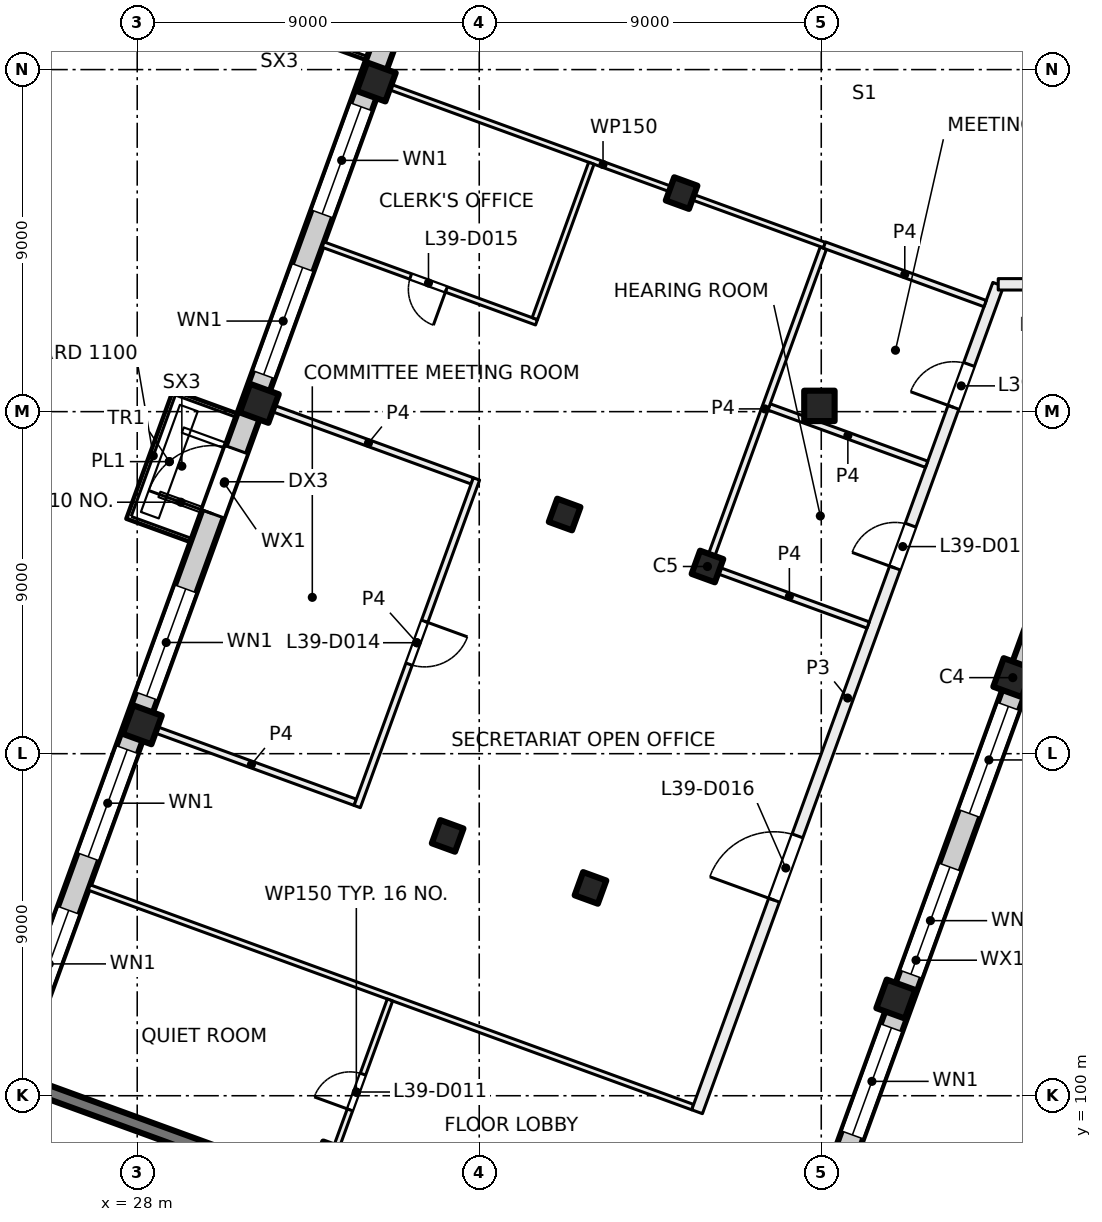
"""IFC4 building model, lengths in metres.
Left out: names, types, materials, properties, quantities, classifications, styles, units other than length and angle.
Written with IfcOpenShell. Run it as: python <this file> out.ifc"""

import sys

from ifc_helpers import new_model, si_unit, direction, frame, frame_2d, origin, origin_2d, place, context, subcontext, project, spatial, rectangle, extrude, element, fill, save


model = new_model("IFC4")
c1 = context("Model", 3, precision=1e-05, world=origin(), true_north=direction((0.0, 1.0)))
c2 = subcontext(c1, "Body", "Model", "MODEL_VIEW")
j1 = project(units=[si_unit("LENGTHUNIT", "METRE"), si_unit("PLANEANGLEUNIT", "RADIAN")], contexts=[c1])
p1 = place(None, origin())
s1 = spatial("IfcSite", under=j1, at=p1, CompositionType="ELEMENT")
p2 = place(p1, origin())
s2 = spatial("IfcBuilding", under=s1, at=p2, CompositionType="ELEMENT")
p3 = place(p2, frame((0.0, 0.0, 166.5)))
s3 = spatial("IfcBuildingStorey", under=s2, at=p3, CompositionType="ELEMENT", Elevation=166.5)
p4 = place(p3, frame((45.952, 118.152, 0.0), z_axis=(0.0, 0.0, 1.0), x_axis=(1.0, 0.0, 0.0)))
e1 = element("IfcColumn", 1, at=p4, inside=s3, PredefinedType="COLUMN", context=c2, shape_type="SweptSolid", body=[
    extrude(rectangle(XDim=0.8, YDim=0.8, at=origin_2d()), origin(), (0.0, 0.0, 1.0), 4.0),
])
for number, where, z_axis, x_axis in (
    (2, (43.006, 113.925, 0.0), (0.0, 0.0, 1.0), (-0.342, -0.94, 0.0)),
    (3, (39.927, 105.468, 0.0), (0.0, 0.0, 1.0), (-0.342, -0.94, 0.0)),
    (4, (42.325, 123.751, 0.0), (0.0, 0.0, 1.0), (-0.342, -0.94, 0.0)),
    (5, (39.247, 115.293, 0.0), (0.0, 0.0, 1.0), (-0.342, -0.94, 0.0)),
    (6, (36.169, 106.836, 0.0), (0.0, 0.0, 1.0), (-0.342, -0.94, 0.0)),
    (7, (33.091, 98.379, 0.0), (0.0, 0.0, 1.0), (-0.342, -0.94, 0.0)),
):
    element("IfcColumn", number, at=place(p3, frame(where, z_axis=z_axis, x_axis=x_axis)), inside=s3, PredefinedType="COLUMN", context=c2, shape_type="SweptSolid", body=[
        extrude(rectangle(XDim=0.65, YDim=0.65, at=origin_2d()), origin(), (0.0, 0.0, 1.0), 4.0),
    ])
for number, where, z_axis, x_axis in (
    (8, (51.04, 111.001, 0.0), (0.0, 0.0, 1.0), (-0.342, -0.94, 0.0)),
    (9, (47.962, 102.544, 0.0), (0.0, 0.0, 1.0), (-0.342, -0.94, 0.0)),
    (10, (34.291, 126.675, 0.0), (0.0, 0.0, 1.0), (-0.342, -0.94, 0.0)),
    (11, (31.212, 118.218, 0.0), (0.0, 0.0, 1.0), (-0.342, -0.94, 0.0)),
    (12, (28.134, 109.76, 0.0), (0.0, 0.0, 1.0), (-0.342, -0.94, 0.0)),
):
    element("IfcColumn", number, at=place(p3, frame(where, z_axis=z_axis, x_axis=x_axis)), inside=s3, PredefinedType="COLUMN", context=c2, shape_type="SweptSolid", body=[
        extrude(rectangle(XDim=0.8, YDim=0.8, at=origin_2d()), origin(), (0.0, 0.0, 1.0), 4.0),
    ])
p5 = place(p3, frame((32.962, 97.441, 0.0), z_axis=(0.0, 0.0, 1.0), x_axis=(-0.939689545667, 0.342028592028, 0.0)))
e13 = element("IfcWall", 13, at=p5, inside=s3, PredefinedType="SHEAR", context=c2, shape_type="SweptSolid", body=[
    extrude(rectangle(XDim=8.65, YDim=0.35, at=frame_2d((4.325, 0.0))), origin(), (0.0, 0.0, 1.0), 4.0),
])
p6 = place(p3, frame((52.212, 113.783, 0.0), z_axis=(0.0, 0.0, 1.0), x_axis=(-0.34202521188, -0.939690775968, 0.0)))
e14 = element("IfcWall", 14, at=p6, inside=s3, PredefinedType="SOLIDWALL", context=c2, shape_type="SweptSolid", body=[
    extrude(rectangle(XDim=21.745, YDim=0.6, at=frame_2d((10.873, 0.0))), origin(), (0.0, 0.0, 1.0), 3.625),
])
p7 = place(p6, frame((3.765, 0.0, 0.9)))
e15 = element("IfcOpeningElement", 15, at=p7, cuts=e14, PredefinedType="OPENING", context=c2, shape_type="SweptSolid", body=[
    extrude(rectangle(XDim=3.0, YDim=2.4, at=frame_2d((1.5, 1.2))), frame((0.0, 0.31, 0.0), z_axis=(0.0, -1.0, 0.0), x_axis=(1.0, 0.0, 0.0)), (0.0, 0.0, 1.0), 0.62),
])
p8 = place(p6, frame((8.265, 0.0, 0.9)))
e16 = element("IfcOpeningElement", 16, at=p8, cuts=e14, PredefinedType="OPENING", context=c2, shape_type="SweptSolid", body=[
    extrude(rectangle(XDim=3.0, YDim=2.4, at=frame_2d((1.5, 1.2))), frame((0.0, 0.31, 0.0), z_axis=(0.0, -1.0, 0.0), x_axis=(1.0, 0.0, 0.0)), (0.0, 0.0, 1.0), 0.62),
])
p9 = place(p6, frame((12.765, 0.0, 0.9)))
e17 = element("IfcOpeningElement", 17, at=p9, cuts=e14, PredefinedType="OPENING", context=c2, shape_type="SweptSolid", body=[
    extrude(rectangle(XDim=3.0, YDim=2.4, at=frame_2d((1.5, 1.2))), frame((0.0, 0.31, 0.0), z_axis=(0.0, -1.0, 0.0), x_axis=(1.0, 0.0, 0.0)), (0.0, 0.0, 1.0), 0.62),
])
p10 = place(p6, frame((17.265, 0.0, 0.9)))
e18 = element("IfcOpeningElement", 18, at=p10, cuts=e14, PredefinedType="OPENING", context=c2, shape_type="SweptSolid", body=[
    extrude(rectangle(XDim=3.0, YDim=2.4, at=frame_2d((1.5, 1.2))), frame((0.0, 0.31, 0.0), z_axis=(0.0, -1.0, 0.0), x_axis=(1.0, 0.0, 0.0)), (0.0, 0.0, 1.0), 0.62),
])
p11 = place(p3, frame((24.666, 100.669, 0.0), z_axis=(0.0, 0.0, 1.0), x_axis=(0.34201964167, 0.939692803373, 0.0)))
e19 = element("IfcWall", 19, at=p11, inside=s3, PredefinedType="SOLIDWALL", context=c2, shape_type="SweptSolid", body=[
    extrude(rectangle(XDim=32.884, YDim=0.6, at=frame_2d((16.442, 0.0))), origin(), (0.0, 0.0, 1.0), 3.625),
])
p12 = place(p11, frame((1.48, 0.0, 0.9)))
e20 = element("IfcOpeningElement", 20, at=p12, cuts=e19, PredefinedType="OPENING", context=c2, shape_type="SweptSolid", body=[
    extrude(rectangle(XDim=3.0, YDim=2.4, at=frame_2d((1.5, 1.2))), frame((0.0, 0.31, 0.0), z_axis=(0.0, -1.0, 0.0), x_axis=(1.0, 0.0, 0.0)), (0.0, 0.0, 1.0), 0.62),
])
p13 = place(p11, frame((5.98, 0.0, 0.9)))
e21 = element("IfcOpeningElement", 21, at=p13, cuts=e19, PredefinedType="OPENING", context=c2, shape_type="SweptSolid", body=[
    extrude(rectangle(XDim=3.0, YDim=2.4, at=frame_2d((1.5, 1.2))), frame((0.0, 0.31, 0.0), z_axis=(0.0, -1.0, 0.0), x_axis=(1.0, 0.0, 0.0)), (0.0, 0.0, 1.0), 0.62),
])
p14 = place(p11, frame((10.48, 0.0, 0.9)))
e22 = element("IfcOpeningElement", 22, at=p14, cuts=e19, PredefinedType="OPENING", context=c2, shape_type="SweptSolid", body=[
    extrude(rectangle(XDim=3.0, YDim=2.4, at=frame_2d((1.5, 1.2))), frame((0.0, 0.31, 0.0), z_axis=(0.0, -1.0, 0.0), x_axis=(1.0, 0.0, 0.0)), (0.0, 0.0, 1.0), 0.62),
])
p15 = place(p11, frame((15.58, 0.0, 0.0)))
e23 = element("IfcOpeningElement", 23, at=p15, cuts=e19, PredefinedType="OPENING", context=c2, shape_type="SweptSolid", body=[
    extrude(rectangle(XDim=1.8, YDim=2.4, at=frame_2d((0.9, 1.2))), frame((0.0, 0.31, 0.0), z_axis=(0.0, -1.0, 0.0), x_axis=(1.0, 0.0, 0.0)), (0.0, 0.0, 1.0), 0.62),
])
p16 = place(p11, frame((19.48, 0.0, 0.9)))
e24 = element("IfcOpeningElement", 24, at=p16, cuts=e19, PredefinedType="OPENING", context=c2, shape_type="SweptSolid", body=[
    extrude(rectangle(XDim=3.0, YDim=2.4, at=frame_2d((1.5, 1.2))), frame((0.0, 0.31, 0.0), z_axis=(0.0, -1.0, 0.0), x_axis=(1.0, 0.0, 0.0)), (0.0, 0.0, 1.0), 0.62),
])
p17 = place(p11, frame((23.98, 0.0, 0.9)))
e25 = element("IfcOpeningElement", 25, at=p17, cuts=e19, PredefinedType="OPENING", context=c2, shape_type="SweptSolid", body=[
    extrude(rectangle(XDim=3.0, YDim=2.4, at=frame_2d((1.5, 1.2))), frame((0.0, 0.31, 0.0), z_axis=(0.0, -1.0, 0.0), x_axis=(1.0, 0.0, 0.0)), (0.0, 0.0, 1.0), 0.62),
])
p18 = place(p11, frame((29.08, 0.0, 0.0)))
e26 = element("IfcOpeningElement", 26, at=p18, cuts=e19, PredefinedType="OPENING", context=c2, shape_type="SweptSolid", body=[
    extrude(rectangle(XDim=1.8, YDim=2.4, at=frame_2d((0.9, 1.2))), frame((0.0, 0.31, 0.0), z_axis=(0.0, -1.0, 0.0), x_axis=(1.0, 0.0, 0.0)), (0.0, 0.0, 1.0), 0.62),
])
p19 = place(p3, frame((26.736, 105.48, 0.0), z_axis=(0.0, 0.0, 1.0), x_axis=(0.939695108427, -0.342013308511, 0.0)))
e27 = element("IfcWall", 27, at=p19, inside=s3, PredefinedType="PARTITIONING", context=c2, shape_type="SweptSolid", body=[
    extrude(rectangle(XDim=16.9, YDim=0.15, at=frame_2d((8.45, 0.0))), origin(), (0.0, 0.0, 1.0), 3.625),
])
p20 = place(p3, frame((31.353, 118.166, 0.0), z_axis=(0.0, 0.0, 1.0), x_axis=(0.939708789041, -0.341975718143, 0.0)))
e28 = element("IfcWall", 28, at=p20, inside=s3, PredefinedType="PARTITIONING", context=c2, shape_type="SweptSolid", body=[
    extrude(rectangle(XDim=5.813, YDim=0.175, at=frame_2d((2.907, 0.0))), origin(), (0.0, 0.0, 1.0), 3.625),
])
p21 = place(p3, frame((33.737, 107.721, 0.0), z_axis=(0.0, 0.0, 1.0), x_axis=(-0.939694052357, 0.34201621009, 0.0)))
e29 = element("IfcWall", 29, at=p21, inside=s3, PredefinedType="PARTITIONING", context=c2, shape_type="SweptSolid", body=[
    extrude(rectangle(XDim=5.813, YDim=0.175, at=frame_2d((2.906, 0.0))), origin(), (0.0, 0.0, 1.0), 3.625),
])
p22 = place(p3, frame((34.431, 126.624, 0.0), z_axis=(0.0, 0.0, 1.0), x_axis=(0.939703144457, -0.341991228392, 0.0)))
e30 = element("IfcWall", 30, at=p22, inside=s3, PredefinedType="PARTITIONING", context=c2, shape_type="SweptSolid", body=[
    extrude(rectangle(XDim=12.401, YDim=0.15, at=frame_2d((6.2, 0.0))), origin(), (0.0, 0.0, 1.0), 3.625),
])
p23 = place(p3, frame((32.881, 97.657, 0.0), z_axis=(0.0, 0.0, 1.0), x_axis=(0.341981688871, 0.939706616172, 0.0)))
e31 = element("IfcWall", 31, at=p23, inside=s3, PredefinedType="PARTITIONING", context=c2, shape_type="SweptSolid", body=[
    extrude(rectangle(XDim=5.175, YDim=0.15, at=frame_2d((2.587, 0.0))), origin(), (0.0, 0.0, 1.0), 3.625),
])
p24 = place(p23, frame((2.098, 0.0, 0.0)))
e32 = element("IfcOpeningElement", 32, at=p24, cuts=e31, PredefinedType="OPENING", context=c2, shape_type="SweptSolid", body=[
    extrude(rectangle(XDim=1.0, YDim=2.1, at=frame_2d((0.5, 1.05))), frame((0.0, 0.085, 0.0), z_axis=(0.0, -1.0, 0.0), x_axis=(1.0, 0.0, 0.0)), (0.0, 0.0, 1.0), 0.17),
])
p25 = place(p3, frame((36.928, 116.23, 0.0), z_axis=(0.0, 0.0, 1.0), x_axis=(-0.342125481497, -0.93965427414, 0.0)))
e33 = element("IfcWall", 33, at=p25, inside=s3, PredefinedType="PARTITIONING", context=c2, shape_type="SweptSolid", body=[
    extrude(rectangle(XDim=9.175, YDim=0.175, at=frame_2d((4.587, 0.0))), origin(), (0.0, 0.0, 1.0), 3.625),
])
p26 = place(p25, frame((3.987, 0.0, 0.0)))
e34 = element("IfcOpeningElement", 34, at=p26, cuts=e33, PredefinedType="OPENING", context=c2, shape_type="SweptSolid", body=[
    extrude(rectangle(XDim=1.2, YDim=2.1, at=frame_2d((0.6, 1.05))), frame((0.0, 0.097, 0.0), z_axis=(0.0, -1.0, 0.0), x_axis=(1.0, 0.0, 0.0)), (0.0, 0.0, 1.0), 0.195),
])
p27 = place(p3, frame((38.507, 120.351, 0.0), z_axis=(0.0, 0.0, 1.0), x_axis=(-0.939678850769, 0.342057973766, 0.0)))
e35 = element("IfcWall", 35, at=p27, inside=s3, PredefinedType="PARTITIONING", context=c2, shape_type="SweptSolid", body=[
    extrude(rectangle(XDim=5.975, YDim=0.15, at=frame_2d((2.988, 0.0))), origin(), (0.0, 0.0, 1.0), 3.625),
])
p28 = place(p27, frame((2.525, 0.0, 0.0)))
e36 = element("IfcOpeningElement", 36, at=p28, cuts=e35, PredefinedType="OPENING", context=c2, shape_type="SweptSolid", body=[
    extrude(rectangle(XDim=1.0, YDim=2.1, at=frame_2d((0.5, 1.05))), frame((0.0, 0.085, 0.0), z_axis=(0.0, -1.0, 0.0), x_axis=(1.0, 0.0, 0.0)), (0.0, 0.0, 1.0), 0.17),
])
p29 = place(p3, frame((39.95, 124.536, 0.0), z_axis=(0.0, 0.0, 1.0), x_axis=(-0.341783611499, -0.939778677621, 0.0)))
e37 = element("IfcWall", 37, at=p29, inside=s3, PredefinedType="PARTITIONING", context=c2, shape_type="SweptSolid", body=[
    extrude(rectangle(XDim=4.351, YDim=0.15, at=frame_2d((2.175, 0.0))), origin(), (0.0, 0.0, 1.0), 3.625),
])
p30 = place(p3, frame((42.732, 99.579, 0.0), z_axis=(0.0, 0.0, 1.0), x_axis=(0.342036653044, 0.939686611576, 0.0)))
e38 = element("IfcWall", 38, at=p30, inside=s3, PredefinedType="PARTITIONING", context=c2, shape_type="SweptSolid", body=[
    extrude(rectangle(XDim=23.167, YDim=0.3, at=frame_2d((11.583, 0.0))), origin(), (0.0, 0.0, 1.0), 3.625),
])
p31 = place(p30, frame((15.225, 0.0, 0.0)))
e39 = element("IfcOpeningElement", 39, at=p31, cuts=e38, PredefinedType="OPENING", context=c2, shape_type="SweptSolid", body=[
    extrude(rectangle(XDim=1.2, YDim=2.1, at=frame_2d((0.6, 1.05))), frame((0.0, 0.16, 0.0), z_axis=(0.0, -1.0, 0.0), x_axis=(1.0, 0.0, 0.0)), (0.0, 0.0, 1.0), 0.32),
])
p32 = place(p30, frame((19.725, 0.0, 0.0)))
e40 = element("IfcOpeningElement", 40, at=p32, cuts=e38, PredefinedType="OPENING", context=c2, shape_type="SweptSolid", body=[
    extrude(rectangle(XDim=1.2, YDim=2.1, at=frame_2d((0.6, 1.05))), frame((0.0, 0.16, 0.0), z_axis=(0.0, -1.0, 0.0), x_axis=(1.0, 0.0, 0.0)), (0.0, 0.0, 1.0), 0.32),
])
p33 = place(p30, frame((5.925, 0.0, 0.0)))
e41 = element("IfcOpeningElement", 41, at=p33, cuts=e38, PredefinedType="OPENING", context=c2, shape_type="SweptSolid", body=[
    extrude(rectangle(XDim=1.8, YDim=2.1, at=frame_2d((0.9, 1.05))), frame((0.0, 0.16, 0.0), z_axis=(0.0, -1.0, 0.0), x_axis=(1.0, 0.0, 0.0)), (0.0, 0.0, 1.0), 0.32),
])
for number, where, z_axis, x_axis in (
    (42, (43.088, 113.895, 0.0), (0.0, 0.0, 1.0), (0.94, -0.342, 0.0)),
    (43, (44.627, 118.124, 0.0), (0.0, 0.0, 1.0), (0.94, -0.342, 0.0)),
):
    element("IfcWall", number, at=place(p3, frame(where, z_axis=z_axis, x_axis=x_axis)), inside=s3, PredefinedType="PARTITIONING", context=c2, shape_type="SweptSolid", body=[
        extrude(rectangle(XDim=4.412, YDim=0.175, at=frame_2d((2.206, 0.0))), origin(), (0.0, 0.0, 1.0), 3.625),
    ])
p34 = place(p3, frame((46.054, 122.301, 0.0), z_axis=(0.0, 0.0, 1.0), x_axis=(-0.341963022424, -0.939713409128, 0.0)))
e44 = element("IfcWall", 44, at=p34, inside=s3, PredefinedType="PARTITIONING", context=c2, shape_type="SweptSolid", body=[
    extrude(rectangle(XDim=9.001, YDim=0.175, at=frame_2d((4.5, 0.0))), origin(), (0.0, 0.0, 1.0), 3.625),
])
p35 = place(p3, frame((50.312, 120.843, 0.0), z_axis=(0.0, 0.0, 1.0), x_axis=(-0.939609529273, 0.342248349154, 0.0)))
e45 = element("IfcWall", 45, at=p35, inside=s3, PredefinedType="PARTITIONING", context=c2, shape_type="SweptSolid", body=[
    extrude(rectangle(XDim=4.5, YDim=0.175, at=frame_2d((2.25, 0.0))), origin(), (0.0, 0.0, 1.0), 3.625),
])
p36 = place(p3, frame((50.657, 121.35, 0.0), z_axis=(0.0, 0.0, 1.0), x_axis=(1.0, 0.0, 0.0)))
e46 = element("IfcWall", 46, at=p36, inside=s3, PredefinedType="PARTITIONING", context=c2, shape_type="SweptSolid", body=[
    extrude(rectangle(XDim=35.096, YDim=0.3, at=frame_2d((17.548, 0.0))), origin(), (0.0, 0.0, 1.0), 3.625),
])
p37 = place(p36, frame((30.093, 0.0, 0.0)))
e47 = element("IfcOpeningElement", 47, at=p37, cuts=e46, PredefinedType="OPENING", context=c2, shape_type="SweptSolid", body=[
    extrude(rectangle(XDim=1.0, YDim=2.1, at=frame_2d((0.5, 1.05))), frame((0.0, 0.16, 0.0), z_axis=(0.0, -1.0, 0.0), x_axis=(1.0, 0.0, 0.0)), (0.0, 0.0, 1.0), 0.32),
])
p38 = place(p36, frame((13.943, 0.0, 0.0)))
e48 = element("IfcOpeningElement", 48, at=p38, cuts=e46, PredefinedType="OPENING", context=c2, shape_type="SweptSolid", body=[
    extrude(rectangle(XDim=1.8, YDim=2.1, at=frame_2d((0.9, 1.05))), frame((0.0, 0.16, 0.0), z_axis=(0.0, -1.0, 0.0), x_axis=(1.0, 0.0, 0.0)), (0.0, 0.0, 1.0), 0.32),
])
p39 = place(p36, frame((0.896, 0.0, 0.0)))
e49 = element("IfcOpeningElement", 49, at=p39, cuts=e46, PredefinedType="OPENING", context=c2, shape_type="SweptSolid", body=[
    extrude(rectangle(XDim=1.8, YDim=2.1, at=frame_2d((0.9, 1.05))), frame((0.0, 0.16, 0.0), z_axis=(0.0, -1.0, 0.0), x_axis=(1.0, 0.0, 0.0)), (0.0, 0.0, 1.0), 0.32),
])
p40 = place(p7, origin())
e50 = element("IfcWindow", 50, at=p40, inside=s3, PartitioningType="SINGLE_PANEL", PredefinedType="WINDOW", context=c2, shape_type="SweptSolid", body=[
    extrude(rectangle(XDim=3.0, YDim=2.4, at=frame_2d((1.5, 1.2))), frame((0.0, 0.03, 0.0), z_axis=(0.0, -1.0, 0.0), x_axis=(1.0, 0.0, 0.0)), (0.0, 0.0, 1.0), 0.06),
])
fill(e15, e50)
p41 = place(p8, origin())
e51 = element("IfcWindow", 51, at=p41, inside=s3, PartitioningType="SINGLE_PANEL", PredefinedType="WINDOW", context=c2, shape_type="SweptSolid", body=[
    extrude(rectangle(XDim=3.0, YDim=2.4, at=frame_2d((1.5, 1.2))), frame((0.0, 0.03, 0.0), z_axis=(0.0, -1.0, 0.0), x_axis=(1.0, 0.0, 0.0)), (0.0, 0.0, 1.0), 0.06),
])
fill(e16, e51)
p42 = place(p9, origin())
e52 = element("IfcWindow", 52, at=p42, inside=s3, PartitioningType="SINGLE_PANEL", PredefinedType="WINDOW", context=c2, shape_type="SweptSolid", body=[
    extrude(rectangle(XDim=3.0, YDim=2.4, at=frame_2d((1.5, 1.2))), frame((0.0, 0.03, 0.0), z_axis=(0.0, -1.0, 0.0), x_axis=(1.0, 0.0, 0.0)), (0.0, 0.0, 1.0), 0.06),
])
fill(e17, e52)
p43 = place(p12, origin())
e53 = element("IfcWindow", 53, at=p43, inside=s3, PartitioningType="SINGLE_PANEL", PredefinedType="WINDOW", context=c2, shape_type="SweptSolid", body=[
    extrude(rectangle(XDim=3.0, YDim=2.4, at=frame_2d((1.5, 1.2))), frame((0.0, 0.03, 0.0), z_axis=(0.0, -1.0, 0.0), x_axis=(1.0, 0.0, 0.0)), (0.0, 0.0, 1.0), 0.06),
])
fill(e20, e53)
p44 = place(p13, origin())
e54 = element("IfcWindow", 54, at=p44, inside=s3, PartitioningType="SINGLE_PANEL", PredefinedType="WINDOW", context=c2, shape_type="SweptSolid", body=[
    extrude(rectangle(XDim=3.0, YDim=2.4, at=frame_2d((1.5, 1.2))), frame((0.0, 0.03, 0.0), z_axis=(0.0, -1.0, 0.0), x_axis=(1.0, 0.0, 0.0)), (0.0, 0.0, 1.0), 0.06),
])
fill(e21, e54)
p45 = place(p14, origin())
e55 = element("IfcWindow", 55, at=p45, inside=s3, PartitioningType="SINGLE_PANEL", PredefinedType="WINDOW", context=c2, shape_type="SweptSolid", body=[
    extrude(rectangle(XDim=3.0, YDim=2.4, at=frame_2d((1.5, 1.2))), frame((0.0, 0.03, 0.0), z_axis=(0.0, -1.0, 0.0), x_axis=(1.0, 0.0, 0.0)), (0.0, 0.0, 1.0), 0.06),
])
fill(e22, e55)
p46 = place(p15, origin())
e56 = element("IfcDoor", 56, at=p46, inside=s3, OperationType="DOUBLE_DOOR_SINGLE_SWING", PredefinedType="DOOR", context=c2, shape_type="SweptSolid", body=[
    extrude(rectangle(XDim=1.8, YDim=2.4, at=frame_2d((0.9, 1.2))), frame((0.0, 0.025, 0.0), z_axis=(0.0, -1.0, 0.0), x_axis=(1.0, 0.0, 0.0)), (0.0, 0.0, 1.0), 0.05),
])
fill(e23, e56)
p47 = place(p16, origin())
e57 = element("IfcWindow", 57, at=p47, inside=s3, PartitioningType="SINGLE_PANEL", PredefinedType="WINDOW", context=c2, shape_type="SweptSolid", body=[
    extrude(rectangle(XDim=3.0, YDim=2.4, at=frame_2d((1.5, 1.2))), frame((0.0, 0.03, 0.0), z_axis=(0.0, -1.0, 0.0), x_axis=(1.0, 0.0, 0.0)), (0.0, 0.0, 1.0), 0.06),
])
fill(e24, e57)
p48 = place(p17, origin())
e58 = element("IfcWindow", 58, at=p48, inside=s3, PartitioningType="SINGLE_PANEL", PredefinedType="WINDOW", context=c2, shape_type="SweptSolid", body=[
    extrude(rectangle(XDim=3.0, YDim=2.4, at=frame_2d((1.5, 1.2))), frame((0.0, 0.03, 0.0), z_axis=(0.0, -1.0, 0.0), x_axis=(1.0, 0.0, 0.0)), (0.0, 0.0, 1.0), 0.06),
])
fill(e25, e58)
p49 = place(p24, origin())
e59 = element("IfcDoor", 59, at=p49, inside=s3, OperationType="SINGLE_SWING_LEFT", PredefinedType="DOOR", context=c2, shape_type="SweptSolid", body=[
    extrude(rectangle(XDim=1.0, YDim=2.1, at=frame_2d((0.5, 1.05))), frame((0.0, 0.025, 0.0), z_axis=(0.0, -1.0, 0.0), x_axis=(1.0, 0.0, 0.0)), (0.0, 0.0, 1.0), 0.05),
])
fill(e32, e59)
p50 = place(p31, origin())
e60 = element("IfcDoor", 60, at=p50, inside=s3, OperationType="DOUBLE_DOOR_SINGLE_SWING", PredefinedType="DOOR", context=c2, shape_type="SweptSolid", body=[
    extrude(rectangle(XDim=1.2, YDim=2.1, at=frame_2d((0.6, 1.05))), frame((0.0, 0.025, 0.0), z_axis=(0.0, -1.0, 0.0), x_axis=(1.0, 0.0, 0.0)), (0.0, 0.0, 1.0), 0.05),
])
fill(e39, e60)
p51 = place(p32, origin())
e61 = element("IfcDoor", 61, at=p51, inside=s3, OperationType="DOUBLE_DOOR_SINGLE_SWING", PredefinedType="DOOR", context=c2, shape_type="SweptSolid", body=[
    extrude(rectangle(XDim=1.2, YDim=2.1, at=frame_2d((0.6, 1.05))), frame((0.0, 0.025, 0.0), z_axis=(0.0, -1.0, 0.0), x_axis=(1.0, 0.0, 0.0)), (0.0, 0.0, 1.0), 0.05),
])
fill(e40, e61)
p52 = place(p26, origin())
e62 = element("IfcDoor", 62, at=p52, inside=s3, OperationType="DOUBLE_DOOR_SINGLE_SWING", PredefinedType="DOOR", context=c2, shape_type="SweptSolid", body=[
    extrude(rectangle(XDim=1.2, YDim=2.1, at=frame_2d((0.6, 1.05))), frame((0.0, 0.025, 0.0), z_axis=(0.0, -1.0, 0.0), x_axis=(1.0, 0.0, 0.0)), (0.0, 0.0, 1.0), 0.05),
])
fill(e34, e62)
p53 = place(p28, origin())
e63 = element("IfcDoor", 63, at=p53, inside=s3, OperationType="SINGLE_SWING_LEFT", PredefinedType="DOOR", context=c2, shape_type="SweptSolid", body=[
    extrude(rectangle(XDim=1.0, YDim=2.1, at=frame_2d((0.5, 1.05))), frame((0.0, 0.025, 0.0), z_axis=(0.0, -1.0, 0.0), x_axis=(1.0, 0.0, 0.0)), (0.0, 0.0, 1.0), 0.05),
])
fill(e36, e63)
p54 = place(p33, origin())
e64 = element("IfcDoor", 64, at=p54, inside=s3, OperationType="DOUBLE_DOOR_SINGLE_SWING", PredefinedType="DOOR", context=c2, shape_type="SweptSolid", body=[
    extrude(rectangle(XDim=1.8, YDim=2.1, at=frame_2d((0.9, 1.05))), frame((0.0, 0.025, 0.0), z_axis=(0.0, -1.0, 0.0), x_axis=(1.0, 0.0, 0.0)), (0.0, 0.0, 1.0), 0.05),
])
fill(e41, e64)
save(model, sys.argv[1])
